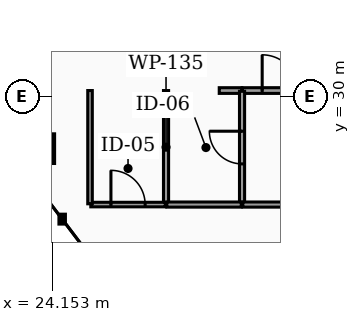
"""IFC4 building model, lengths in metres.
Left out: names, types, materials, properties, quantities, classifications, styles, units other than length and angle.
Written with IfcOpenShell. Run it as: python <this file> out.ifc"""

import sys

from ifc_helpers import new_model, si_unit, direction, frame, frame_2d, origin, origin_2d, place, context, subcontext, project, spatial, rectangle, hollow_rectangle, extrude, element, fill, save


model = new_model("IFC4")
c1 = context("Model", 3, precision=1e-05, world=origin(), true_north=direction((0.0, 1.0)))
c2 = subcontext(c1, "Body", "Model", "MODEL_VIEW")
j1 = project(units=[si_unit("LENGTHUNIT", "METRE"), si_unit("PLANEANGLEUNIT", "RADIAN")], contexts=[c1])
p1 = place(None, origin())
s1 = spatial("IfcSite", under=j1, at=p1, CompositionType="ELEMENT")
p2 = place(p1, origin())
s2 = spatial("IfcBuilding", under=s1, at=p2, CompositionType="ELEMENT")
p3 = place(p2, frame((0.0, 0.0, 187.0)))
s3 = spatial("IfcBuildingStorey", under=s2, at=p3, CompositionType="ELEMENT", Elevation=187.0)
p4 = place(p3, frame((23.827, 28.621, 0.0), z_axis=(0.0, 0.0, 1.0), x_axis=(1.0, 0.0, 0.0)))
e1 = element("IfcColumn", 1, at=p4, inside=s3, PredefinedType="COLUMN", context=c2, shape_type="SweptSolid", body=[
    extrude(hollow_rectangle(XDim=0.7, YDim=0.7, WallThickness=0.035, at=origin_2d()), origin(), (0.0, 0.0, 1.0), 3.5),
])
p5 = place(p3, frame((28.55, 30.15, 0.0), z_axis=(0.0, 0.0, 1.0), x_axis=(1.0, 0.0, 0.0)))
e2 = element("IfcWall", 2, at=p5, inside=s3, PredefinedType="PARTITIONING", context=c2, shape_type="SweptSolid", body=[
    extrude(rectangle(XDim=0.595, YDim=0.15, at=frame_2d((0.297, 0.0))), origin(), (0.0, 0.0, 1.0), 2.457),
])
p6 = place(p3, frame((29.155, 30.15, 0.0), z_axis=(0.0, 0.0, 1.0), x_axis=(1.0, 0.0, 0.0)))
e3 = element("IfcWall", 3, at=p6, inside=s3, PredefinedType="PARTITIONING", context=c2, shape_type="SweptSolid", body=[
    extrude(rectangle(XDim=1.99, YDim=0.15, at=frame_2d((0.995, 0.0))), origin(), (0.0, 0.0, 1.0), 2.457),
])
p7 = place(p6, frame((0.525, 0.0, 0.0)))
e4 = element("IfcOpeningElement", 4, at=p7, cuts=e3, PredefinedType="OPENING", context=c2, shape_type="SweptSolid", body=[
    extrude(rectangle(XDim=0.94, YDim=2.05, at=frame_2d((0.47, 1.025))), frame((0.0, 0.085, 0.0), z_axis=(0.0, -1.0, 0.0), x_axis=(1.0, 0.0, 0.0)), (0.0, 0.0, 1.0), 0.17),
])
p8 = place(p3, frame((27.15, 27.17, 0.0), z_axis=(0.0, 0.0, 1.0), x_axis=(0.0, 1.0, 0.0)))
e5 = element("IfcWall", 5, at=p8, inside=s3, PredefinedType="PARTITIONING", context=c2, shape_type="SweptSolid", body=[
    extrude(rectangle(XDim=2.98, YDim=0.135, at=frame_2d((1.49, 0.0))), origin(), (0.0, 0.0, 1.0), 2.457),
])
p9 = place(p3, frame((25.17, 27.15, 0.0), z_axis=(0.0, 0.0, 1.0), x_axis=(1.0, 0.0, 0.0)))
e6 = element("IfcWall", 6, at=p9, inside=s3, PredefinedType="PARTITIONING", context=c2, shape_type="SweptSolid", body=[
    extrude(rectangle(XDim=1.96, YDim=0.12, at=frame_2d((0.98, 0.0))), origin(), (0.0, 0.0, 1.0), 2.457),
])
p10 = place(p9, frame((0.53, 0.0, 0.0)))
e7 = element("IfcOpeningElement", 7, at=p10, cuts=e6, PredefinedType="OPENING", context=c2, shape_type="SweptSolid", body=[
    extrude(rectangle(XDim=0.9, YDim=2.05, at=frame_2d((0.45, 1.025))), frame((0.0, 0.07, 0.0), z_axis=(0.0, -1.0, 0.0), x_axis=(1.0, 0.0, 0.0)), (0.0, 0.0, 1.0), 0.14),
])
p11 = place(p3, frame((25.15, 27.17, 0.0), z_axis=(0.0, 0.0, 1.0), x_axis=(0.0, 1.0, 0.0)))
e8 = element("IfcWall", 8, at=p11, inside=s3, PredefinedType="PARTITIONING", context=c2, shape_type="SweptSolid", body=[
    extrude(rectangle(XDim=2.98, YDim=0.12, at=frame_2d((1.49, 0.0))), origin(), (0.0, 0.0, 1.0), 2.457),
])
p12 = place(p3, frame((29.15, 27.17, 0.0), z_axis=(0.0, 0.0, 1.0), x_axis=(0.0, 1.0, 0.0)))
e9 = element("IfcWall", 9, at=p12, inside=s3, PredefinedType="PARTITIONING", context=c2, shape_type="SweptSolid", body=[
    extrude(rectangle(XDim=2.96, YDim=0.135, at=frame_2d((1.48, 0.0))), origin(), (0.0, 0.0, 1.0), 2.457),
])
p13 = place(p12, frame((1.05, 0.0, 0.0)))
e10 = element("IfcOpeningElement", 10, at=p13, cuts=e9, PredefinedType="OPENING", context=c2, shape_type="SweptSolid", body=[
    extrude(rectangle(XDim=0.86, YDim=2.05, at=frame_2d((0.43, 1.025))), frame((0.0, 0.077, 0.0), z_axis=(0.0, -1.0, 0.0), x_axis=(1.0, 0.0, 0.0)), (0.0, 0.0, 1.0), 0.155),
])
for number, where, z_axis, x_axis in (
    (11, (27.17, 27.15, 0.0), (0.0, 0.0, 1.0), (1.0, 0.0, 0.0)),
    (12, (29.17, 27.15, 0.0), (0.0, 0.0, 1.0), (1.0, 0.0, 0.0)),
):
    element("IfcWall", number, at=place(p3, frame(where, z_axis=z_axis, x_axis=x_axis)), inside=s3, PredefinedType="PARTITIONING", context=c2, shape_type="SweptSolid", body=[
        extrude(rectangle(XDim=1.96, YDim=0.135, at=frame_2d((0.98, 0.0))), origin(), (0.0, 0.0, 1.0), 2.457),
    ])
p14 = place(p7, origin())
e13 = element("IfcDoor", 13, at=p14, inside=s3, OperationType="SINGLE_SWING_LEFT", PredefinedType="DOOR", context=c2, shape_type="SweptSolid", body=[
    extrude(rectangle(XDim=0.94, YDim=2.05, at=frame_2d((0.47, 1.025))), frame((0.0, 0.025, 0.0), z_axis=(0.0, -1.0, 0.0), x_axis=(1.0, 0.0, 0.0)), (0.0, 0.0, 1.0), 0.05),
])
fill(e4, e13)
p15 = place(p10, origin())
e14 = element("IfcDoor", 14, at=p15, inside=s3, OperationType="SINGLE_SWING_LEFT", PredefinedType="DOOR", context=c2, shape_type="SweptSolid", body=[
    extrude(rectangle(XDim=0.9, YDim=2.05, at=frame_2d((0.45, 1.025))), frame((0.0, 0.025, 0.0), z_axis=(0.0, -1.0, 0.0), x_axis=(1.0, 0.0, 0.0)), (0.0, 0.0, 1.0), 0.05),
])
fill(e7, e14)
p16 = place(p13, origin())
e15 = element("IfcDoor", 15, at=p16, inside=s3, OperationType="SINGLE_SWING_RIGHT", PredefinedType="DOOR", context=c2, shape_type="SweptSolid", body=[
    extrude(rectangle(XDim=0.86, YDim=2.05, at=frame_2d((0.43, 1.025))), frame((0.0, 0.025, 0.0), z_axis=(0.0, -1.0, 0.0), x_axis=(1.0, 0.0, 0.0)), (0.0, 0.0, 1.0), 0.05),
])
fill(e10, e15)
save(model, sys.argv[1])
